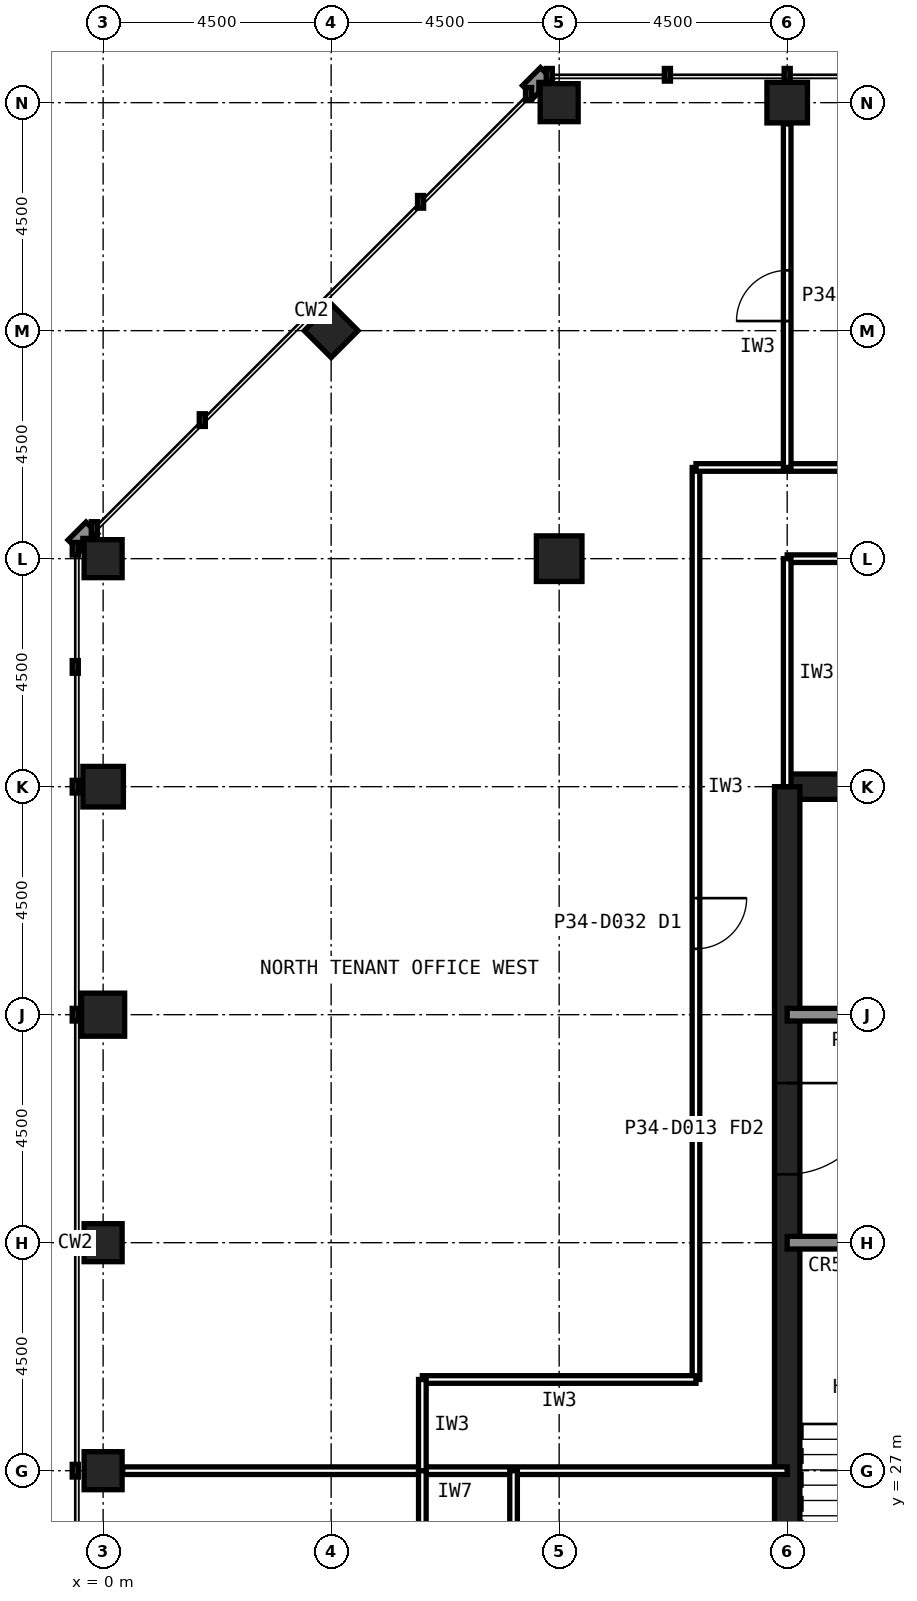
"""IFC4 building model, lengths in metres.
Left out: names, types, materials, properties, quantities, classifications, styles, units other than length and angle.
Written with IfcOpenShell. Run it as: python <this file> out.ifc"""

import sys

from ifc_helpers import new_model, si_unit, direction, frame, frame_2d, origin, origin_2d, place, context, subcontext, project, spatial, rectangle, hollow_rectangle, extrude, element, fill, save


model = new_model("IFC4")
c1 = context("Model", 3, precision=1e-05, world=origin(), true_north=direction((0.0, 1.0)))
c2 = subcontext(c1, "Body", "Model", "MODEL_VIEW")
j1 = project(units=[si_unit("LENGTHUNIT", "METRE"), si_unit("PLANEANGLEUNIT", "RADIAN")], contexts=[c1])
p1 = place(None, origin())
s1 = spatial("IfcSite", under=j1, at=p1, CompositionType="ELEMENT")
p2 = place(p1, origin())
s2 = spatial("IfcBuilding", under=s1, at=p2, CompositionType="ELEMENT")
p3 = place(p2, frame((0.0, 0.0, 143.6)))
s3 = spatial("IfcBuildingStorey", under=s2, at=p3, CompositionType="ELEMENT", Elevation=143.6)
p4 = place(p3, frame((13.5, 54.0, 0.0), z_axis=(0.0, 0.0, 1.0), x_axis=(1.0, 0.0, 0.0)))
e1 = element("IfcColumn", 1, at=p4, inside=s3, PredefinedType="COLUMN", context=c2, shape_type="SweptSolid", body=[
    extrude(hollow_rectangle(XDim=0.8, YDim=0.8, WallThickness=0.045, at=origin_2d()), origin(), (0.0, 0.0, 1.0), 4.0),
])
for number, where, z_axis, x_axis in (
    (2, (9.0, 54.0, 0.0), (0.0, 0.0, 1.0), (1.0, 0.0, 0.0)),
    (3, (0.0, 45.0, 0.0), (0.0, 0.0, 1.0), (1.0, 0.0, 0.0)),
):
    element("IfcColumn", number, at=place(p3, frame(where, z_axis=z_axis, x_axis=x_axis)), inside=s3, PredefinedType="COLUMN", context=c2, shape_type="SweptSolid", body=[
        extrude(hollow_rectangle(XDim=0.75, YDim=0.75, WallThickness=0.04, at=origin_2d()), origin(), (0.0, 0.0, 1.0), 4.0),
    ])
p5 = place(p3, frame((0.0, 40.5, 0.0), z_axis=(0.0, 0.0, 1.0), x_axis=(1.0, 0.0, 0.0)))
e4 = element("IfcColumn", 4, at=p5, inside=s3, PredefinedType="COLUMN", context=c2, shape_type="SweptSolid", body=[
    extrude(hollow_rectangle(XDim=0.8, YDim=0.8, WallThickness=0.045, at=origin_2d()), origin(), (0.0, 0.0, 1.0), 4.0),
])
p6 = place(p3, frame((0.0, 36.0, 0.0), z_axis=(0.0, 0.0, 1.0), x_axis=(1.0, 0.0, 0.0)))
e5 = element("IfcColumn", 5, at=p6, inside=s3, PredefinedType="COLUMN", context=c2, shape_type="SweptSolid", body=[
    extrude(hollow_rectangle(XDim=0.85, YDim=0.85, WallThickness=0.05, at=origin_2d()), origin(), (0.0, 0.0, 1.0), 4.0),
])
for number, where, z_axis, x_axis in (
    (6, (0.0, 31.5, 0.0), (0.0, 0.0, 1.0), (1.0, 0.0, 0.0)),
    (7, (0.0, 27.0, 0.0), (0.0, 0.0, 1.0), (1.0, 0.0, 0.0)),
    (8, (4.5, 49.5, 0.0), (0.0, 0.0, 1.0), (0.707, 0.707, 0.0)),
):
    element("IfcColumn", number, at=place(p3, frame(where, z_axis=z_axis, x_axis=x_axis)), inside=s3, PredefinedType="COLUMN", context=c2, shape_type="SweptSolid", body=[
        extrude(hollow_rectangle(XDim=0.75, YDim=0.75, WallThickness=0.04, at=origin_2d()), origin(), (0.0, 0.0, 1.0), 4.0),
    ])
p7 = place(p3, frame((9.0, 45.0, 0.0), z_axis=(0.0, 0.0, 1.0), x_axis=(1.0, 0.0, 0.0)))
e9 = element("IfcColumn", 9, at=p7, inside=s3, PredefinedType="COLUMN", context=c2, shape_type="SweptSolid", body=[
    extrude(hollow_rectangle(XDim=0.9, YDim=0.9, WallThickness=0.063, at=origin_2d()), origin(), (0.0, 0.0, 1.0), 4.0),
])
p8 = place(p3, frame((40.5, 40.5, 0.0), z_axis=(0.0, 0.0, 1.0), x_axis=(-1.0, 0.0, 0.0)))
e10 = element("IfcWall", 10, at=p8, inside=s3, PredefinedType="SHEAR", context=c2, shape_type="SweptSolid", body=[
    extrude(rectangle(XDim=27.0, YDim=0.5, at=frame_2d((13.5, 0.0))), origin(), (0.0, 0.0, 1.0), 4.0),
])
p9 = place(p3, frame((13.5, 40.5, 0.0), z_axis=(0.0, 0.0, 1.0), x_axis=(0.0, -1.0, 0.0)))
e11 = element("IfcWall", 11, at=p9, inside=s3, PredefinedType="SHEAR", context=c2, shape_type="SweptSolid", body=[
    extrude(rectangle(XDim=27.0, YDim=0.5, at=frame_2d((13.5, 0.0))), origin(), (0.0, 0.0, 1.0), 4.0),
])
p10 = place(p9, frame((19.65, 0.0, 0.0)))
e12 = element("IfcOpeningElement", 12, at=p10, cuts=e11, PredefinedType="OPENING", context=c2, shape_type="SweptSolid", body=[
    extrude(rectangle(XDim=1.2, YDim=2.1, at=frame_2d((0.6, 1.05))), frame((0.0, 0.26, 0.0), z_axis=(0.0, -1.0, 0.0), x_axis=(1.0, 0.0, 0.0)), (0.0, 0.0, 1.0), 0.52),
])
p11 = place(p9, frame((5.85, 0.0, 0.0)))
e13 = element("IfcOpeningElement", 13, at=p11, cuts=e11, PredefinedType="OPENING", context=c2, shape_type="SweptSolid", body=[
    extrude(rectangle(XDim=1.8, YDim=2.1, at=frame_2d((0.9, 1.05))), frame((0.0, 0.26, 0.0), z_axis=(0.0, -1.0, 0.0), x_axis=(1.0, 0.0, 0.0)), (0.0, 0.0, 1.0), 0.52),
])
p12 = place(p3, frame((13.5, 36.0, 0.0), z_axis=(0.0, 0.0, 1.0), x_axis=(1.0, 0.0, 0.0)))
e14 = element("IfcWall", 14, at=p12, inside=s3, PredefinedType="SOLIDWALL", context=c2, shape_type="SweptSolid", body=[
    extrude(rectangle(XDim=27.0, YDim=0.25, at=frame_2d((13.5, 0.0))), origin(), (0.0, 0.0, 1.0), 3.84),
])
p13 = place(p12, frame((1.8, 0.0, 0.0)))
e15 = element("IfcOpeningElement", 15, at=p13, cuts=e14, PredefinedType="OPENING", context=c2, shape_type="SweptSolid", body=[
    extrude(rectangle(XDim=0.9, YDim=2.1, at=frame_2d((0.45, 1.05))), frame((0.0, 0.135, 0.0), z_axis=(0.0, -1.0, 0.0), x_axis=(1.0, 0.0, 0.0)), (0.0, 0.0, 1.0), 0.27),
])
p14 = place(p12, frame((5.55, 0.0, 0.0)))
e16 = element("IfcOpeningElement", 16, at=p14, cuts=e14, PredefinedType="OPENING", context=c2, shape_type="SweptSolid", body=[
    extrude(rectangle(XDim=0.9, YDim=2.1, at=frame_2d((0.45, 1.05))), frame((0.0, 0.135, 0.0), z_axis=(0.0, -1.0, 0.0), x_axis=(1.0, 0.0, 0.0)), (0.0, 0.0, 1.0), 0.27),
])
p15 = place(p12, frame((8.55, 0.0, 0.0)))
e17 = element("IfcOpeningElement", 17, at=p15, cuts=e14, PredefinedType="OPENING", context=c2, shape_type="SweptSolid", body=[
    extrude(rectangle(XDim=0.9, YDim=2.1, at=frame_2d((0.45, 1.05))), frame((0.0, 0.135, 0.0), z_axis=(0.0, -1.0, 0.0), x_axis=(1.0, 0.0, 0.0)), (0.0, 0.0, 1.0), 0.27),
])
p16 = place(p12, frame((11.55, 0.0, 0.0)))
e18 = element("IfcOpeningElement", 18, at=p16, cuts=e14, PredefinedType="OPENING", context=c2, shape_type="SweptSolid", body=[
    extrude(rectangle(XDim=0.9, YDim=2.1, at=frame_2d((0.45, 1.05))), frame((0.0, 0.135, 0.0), z_axis=(0.0, -1.0, 0.0), x_axis=(1.0, 0.0, 0.0)), (0.0, 0.0, 1.0), 0.27),
])
p17 = place(p12, frame((24.1, 0.0, 0.0)))
e19 = element("IfcOpeningElement", 19, at=p17, cuts=e14, PredefinedType="OPENING", context=c2, shape_type="SweptSolid", body=[
    extrude(rectangle(XDim=1.3, YDim=2.2, at=frame_2d((0.65, 1.1))), frame((0.0, 0.135, 0.0), z_axis=(0.0, -1.0, 0.0), x_axis=(1.0, 0.0, 0.0)), (0.0, 0.0, 1.0), 0.27),
])
p18 = place(p3, frame((13.5, 31.5, 0.0), z_axis=(0.0, 0.0, 1.0), x_axis=(1.0, 0.0, 0.0)))
e20 = element("IfcWall", 20, at=p18, inside=s3, PredefinedType="SOLIDWALL", context=c2, shape_type="SweptSolid", body=[
    extrude(rectangle(XDim=27.0, YDim=0.25, at=frame_2d((13.5, 0.0))), origin(), (0.0, 0.0, 1.0), 3.84),
])
p19 = place(p18, frame((24.15, 0.0, 0.0)))
e21 = element("IfcOpeningElement", 21, at=p19, cuts=e20, PredefinedType="OPENING", context=c2, shape_type="SweptSolid", body=[
    extrude(rectangle(XDim=1.2, YDim=2.1, at=frame_2d((0.6, 1.05))), frame((0.0, 0.135, 0.0), z_axis=(0.0, -1.0, 0.0), x_axis=(1.0, 0.0, 0.0)), (0.0, 0.0, 1.0), 0.27),
])
p20 = place(p18, frame((15.3, 0.0, 0.0)))
e22 = element("IfcOpeningElement", 22, at=p20, cuts=e20, PredefinedType="OPENING", context=c2, shape_type="SweptSolid", body=[
    extrude(rectangle(XDim=0.9, YDim=2.1, at=frame_2d((0.45, 1.05))), frame((0.0, 0.135, 0.0), z_axis=(0.0, -1.0, 0.0), x_axis=(1.0, 0.0, 0.0)), (0.0, 0.0, 1.0), 0.27),
])
p21 = place(p18, frame((19.8, 0.0, 0.0)))
e23 = element("IfcOpeningElement", 23, at=p21, cuts=e20, PredefinedType="OPENING", context=c2, shape_type="SweptSolid", body=[
    extrude(rectangle(XDim=0.9, YDim=2.1, at=frame_2d((0.45, 1.05))), frame((0.0, 0.135, 0.0), z_axis=(0.0, -1.0, 0.0), x_axis=(1.0, 0.0, 0.0)), (0.0, 0.0, 1.0), 0.27),
])
p22 = place(p3, frame((0.385, 27.0, 0.0), z_axis=(0.0, 0.0, 1.0), x_axis=(1.0, 0.0, 0.0)))
e24 = element("IfcWall", 24, at=p22, inside=s3, PredefinedType="PARTITIONING", context=c2, shape_type="SweptSolid", body=[
    extrude(rectangle(XDim=13.115, YDim=0.15, at=frame_2d((6.558, 0.0))), origin(), (0.0, 0.0, 1.0), 2.989),
])
p23 = place(p3, frame((11.7, 46.8, 0.0), z_axis=(0.0, 0.0, 1.0), x_axis=(0.0, -1.0, 0.0)))
e25 = element("IfcWall", 25, at=p23, inside=s3, PredefinedType="PARTITIONING", context=c2, shape_type="SweptSolid", body=[
    extrude(rectangle(XDim=18.0, YDim=0.15, at=frame_2d((9.0, 0.0))), origin(), (0.0, 0.0, 1.0), 3.84),
])
p24 = place(p23, frame((8.5, 0.0, 0.0)))
e26 = element("IfcOpeningElement", 26, at=p24, cuts=e25, PredefinedType="OPENING", context=c2, shape_type="SweptSolid", body=[
    extrude(rectangle(XDim=1.0, YDim=2.1, at=frame_2d((0.5, 1.05))), frame((0.0, 0.085, 0.0), z_axis=(0.0, -1.0, 0.0), x_axis=(1.0, 0.0, 0.0)), (0.0, 0.0, 1.0), 0.17),
])
p25 = place(p3, frame((28.8, 46.8, 0.0), z_axis=(0.0, 0.0, 1.0), x_axis=(-1.0, 0.0, 0.0)))
e27 = element("IfcWall", 27, at=p25, inside=s3, PredefinedType="PARTITIONING", context=c2, shape_type="SweptSolid", body=[
    extrude(rectangle(XDim=17.1, YDim=0.15, at=frame_2d((8.55, 0.0))), origin(), (0.0, 0.0, 1.0), 3.84),
])
p26 = place(p25, frame((8.05, 0.0, 0.0)))
e28 = element("IfcOpeningElement", 28, at=p26, cuts=e27, PredefinedType="OPENING", context=c2, shape_type="SweptSolid", body=[
    extrude(rectangle(XDim=1.0, YDim=2.1, at=frame_2d((0.5, 1.05))), frame((0.0, 0.085, 0.0), z_axis=(0.0, -1.0, 0.0), x_axis=(1.0, 0.0, 0.0)), (0.0, 0.0, 1.0), 0.17),
])
p27 = place(p3, frame((11.7, 28.8, 0.0), z_axis=(0.0, 0.0, 1.0), x_axis=(-1.0, 0.0, 0.0)))
e29 = element("IfcWall", 29, at=p27, inside=s3, PredefinedType="PARTITIONING", context=c2, shape_type="SweptSolid", body=[
    extrude(rectangle(XDim=5.4, YDim=0.15, at=frame_2d((2.7, 0.0))), origin(), (0.0, 0.0, 1.0), 3.84),
])
p28 = place(p3, frame((6.3, 28.8, 0.0), z_axis=(0.0, 0.0, 1.0), x_axis=(0.0, -1.0, 0.0)))
e30 = element("IfcWall", 30, at=p28, inside=s3, PredefinedType="PARTITIONING", context=c2, shape_type="SweptSolid", body=[
    extrude(rectangle(XDim=1.8, YDim=0.15, at=frame_2d((0.9, 0.0))), origin(), (0.0, 0.0, 1.0), 3.84),
])
p29 = place(p3, frame((6.3, 27.0, 0.0), z_axis=(0.0, 0.0, 1.0), x_axis=(0.0, -1.0, 0.0)))
e31 = element("IfcWall", 31, at=p29, inside=s3, PredefinedType="PARTITIONING", context=c2, shape_type="SweptSolid", body=[
    extrude(rectangle(XDim=6.3, YDim=0.15, at=frame_2d((3.15, 0.0))), origin(), (0.0, 0.0, 1.0), 3.84),
])
p30 = place(p3, frame((8.1, 27.0, 0.0), z_axis=(0.0, 0.0, 1.0), x_axis=(0.0, -1.0, 0.0)))
e32 = element("IfcWall", 32, at=p30, inside=s3, PredefinedType="PARTITIONING", context=c2, shape_type="SweptSolid", body=[
    extrude(rectangle(XDim=4.5, YDim=0.15, at=frame_2d((2.25, 0.0))), origin(), (0.0, 0.0, 1.0), 3.84),
])
p31 = place(p3, frame((20.25, 45.0, 0.0), z_axis=(0.0, 0.0, 1.0), x_axis=(-1.0, 0.0, 0.0)))
e33 = element("IfcWall", 33, at=p31, inside=s3, PredefinedType="PARTITIONING", context=c2, shape_type="SweptSolid", body=[
    extrude(rectangle(XDim=6.75, YDim=0.15, at=frame_2d((3.375, 0.0))), origin(), (0.0, 0.0, 1.0), 3.84),
])
p32 = place(p31, frame((2.875, 0.0, 0.0)))
e34 = element("IfcOpeningElement", 34, at=p32, cuts=e33, PredefinedType="OPENING", context=c2, shape_type="SweptSolid", body=[
    extrude(rectangle(XDim=1.0, YDim=2.1, at=frame_2d((0.5, 1.05))), frame((0.0, 0.085, 0.0), z_axis=(0.0, -1.0, 0.0), x_axis=(1.0, 0.0, 0.0)), (0.0, 0.0, 1.0), 0.17),
])
p33 = place(p3, frame((13.5, 45.0, 0.0), z_axis=(0.0, 0.0, 1.0), x_axis=(0.0, -1.0, 0.0)))
e35 = element("IfcWall", 35, at=p33, inside=s3, PredefinedType="PARTITIONING", context=c2, shape_type="SweptSolid", body=[
    extrude(rectangle(XDim=4.5, YDim=0.15, at=frame_2d((2.25, 0.0))), origin(), (0.0, 0.0, 1.0), 2.989),
])
p34 = place(p3, frame((13.5, 46.8, 0.0), z_axis=(0.0, 0.0, 1.0), x_axis=(0.0, 1.0, 0.0)))
e36 = element("IfcWall", 36, at=p34, inside=s3, PredefinedType="PARTITIONING", context=c2, shape_type="SweptSolid", body=[
    extrude(rectangle(XDim=6.78, YDim=0.15, at=frame_2d((3.39, 0.0))), origin(), (0.0, 0.0, 1.0), 2.989),
])
p35 = place(p34, frame((2.89, 0.0, 0.0)))
e37 = element("IfcOpeningElement", 37, at=p35, cuts=e36, PredefinedType="OPENING", context=c2, shape_type="SweptSolid", body=[
    extrude(rectangle(XDim=1.0, YDim=2.1, at=frame_2d((0.5, 1.05))), frame((0.0, 0.085, 0.0), z_axis=(0.0, -1.0, 0.0), x_axis=(1.0, 0.0, 0.0)), (0.0, 0.0, 1.0), 0.17),
])
p36 = place(p11, origin())
e38 = element("IfcDoor", 38, at=p36, inside=s3, OperationType="SINGLE_SWING_LEFT", PredefinedType="DOOR", context=c2, shape_type="SweptSolid", body=[
    extrude(rectangle(XDim=1.8, YDim=2.1, at=frame_2d((0.9, 1.05))), frame((0.0, 0.025, 0.0), z_axis=(0.0, -1.0, 0.0), x_axis=(1.0, 0.0, 0.0)), (0.0, 0.0, 1.0), 0.05),
])
fill(e13, e38)
p37 = place(p24, origin())
e39 = element("IfcDoor", 39, at=p37, inside=s3, OperationType="SINGLE_SWING_LEFT", PredefinedType="DOOR", context=c2, shape_type="SweptSolid", body=[
    extrude(rectangle(XDim=1.0, YDim=2.1, at=frame_2d((0.5, 1.05))), frame((0.0, 0.025, 0.0), z_axis=(0.0, -1.0, 0.0), x_axis=(1.0, 0.0, 0.0)), (0.0, 0.0, 1.0), 0.05),
])
fill(e26, e39)
p38 = place(p35, origin())
e40 = element("IfcDoor", 40, at=p38, inside=s3, OperationType="SINGLE_SWING_LEFT", PredefinedType="DOOR", context=c2, shape_type="SweptSolid", body=[
    extrude(rectangle(XDim=1.0, YDim=2.1, at=frame_2d((0.5, 1.05))), frame((0.0, 0.025, 0.0), z_axis=(0.0, -1.0, 0.0), x_axis=(1.0, 0.0, 0.0)), (0.0, 0.0, 1.0), 0.05),
])
fill(e37, e40)
save(model, sys.argv[1])
